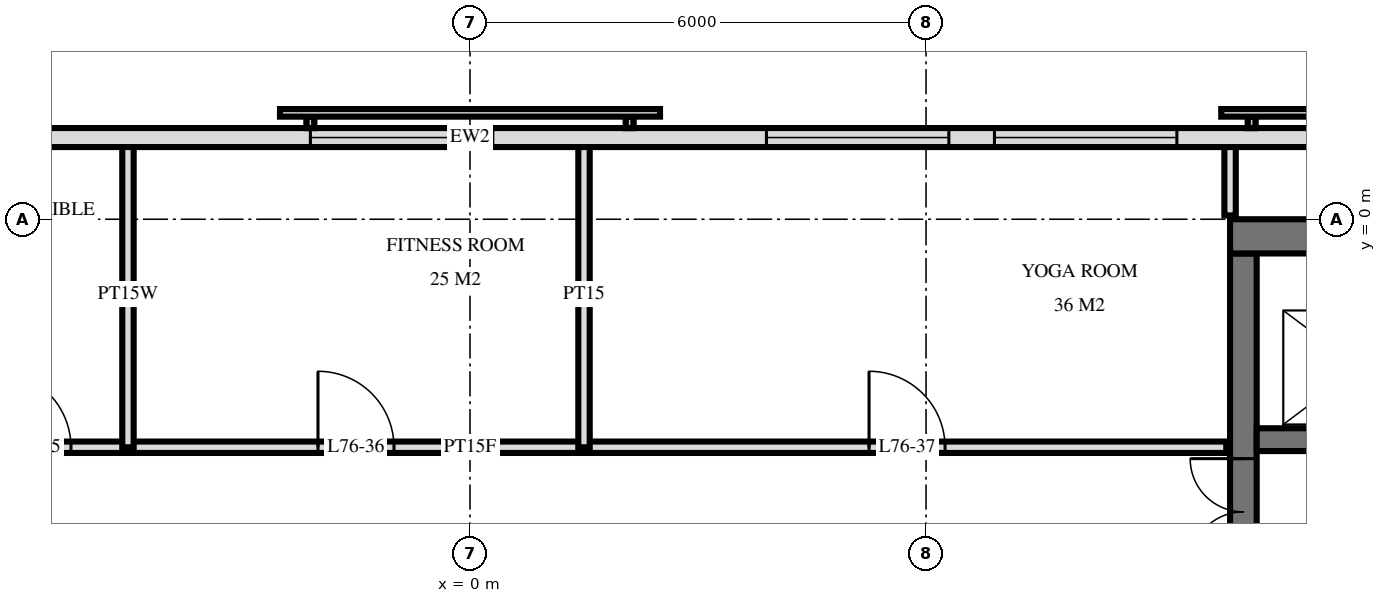
"""IFC4 building model, lengths in metres.
Left out: names, types, materials, properties, quantities, classifications, styles, units other than length and angle.
Written with IfcOpenShell. Run it as: python <this file> out.ifc"""

import sys

from ifc_helpers import new_model, si_unit, direction, frame, frame_2d, origin, place, context, subcontext, project, spatial, rectangle, extrude, element, fill, save


model = new_model("IFC4")
c1 = context("Model", 3, precision=1e-05, world=origin(), true_north=direction((0.0, 1.0)))
c2 = subcontext(c1, "Body", "Model", "MODEL_VIEW")
j1 = project(units=[si_unit("LENGTHUNIT", "METRE"), si_unit("PLANEANGLEUNIT", "RADIAN")], contexts=[c1])
p1 = place(None, origin())
s1 = spatial("IfcSite", under=j1, at=p1, CompositionType="ELEMENT")
p2 = place(p1, origin())
s2 = spatial("IfcBuilding", under=s1, at=p2, CompositionType="ELEMENT")
p3 = place(p2, frame((0.0, 0.0, 287.6)))
s3 = spatial("IfcBuildingStorey", under=s2, at=p3, CompositionType="ELEMENT", Elevation=287.6)
p4 = place(p3, frame((10.0, -0.225, 0.0), z_axis=(0.0, 0.0, 1.0), x_axis=(1.0, 0.0, 0.0)))
e1 = element("IfcWall", 1, at=p4, inside=s3, PredefinedType="SHEAR", context=c2, shape_type="SweptSolid", body=[
    extrude(rectangle(XDim=9.5, YDim=0.45, at=frame_2d((4.75, 0.0))), origin(), (0.0, 0.0, 1.0), 3.5),
])
p5 = place(p3, frame((10.175, -14.55, 0.0), z_axis=(0.0, 0.0, 1.0), x_axis=(0.0, 1.0, 0.0)))
e2 = element("IfcWall", 2, at=p5, inside=s3, PredefinedType="SHEAR", context=c2, shape_type="SweptSolid", body=[
    extrude(rectangle(XDim=14.1, YDim=0.35, at=frame_2d((7.05, 0.0))), origin(), (0.0, 0.0, 1.0), 3.5),
])
p6 = place(p5, frame((8.4, 0.0, 0.0)))
e3 = element("IfcOpeningElement", 3, at=p6, cuts=e2, PredefinedType="OPENING", context=c2, shape_type="SweptSolid", body=[
    extrude(rectangle(XDim=1.4, YDim=2.4, at=frame_2d((0.7, 1.2))), frame((0.0, 0.185, 0.0), z_axis=(0.0, -1.0, 0.0), x_axis=(1.0, 0.0, 0.0)), (0.0, 0.0, 1.0), 0.37),
])
p7 = place(p5, frame((10.0, 0.0, 0.0)))
e4 = element("IfcOpeningElement", 4, at=p7, cuts=e2, PredefinedType="OPENING", context=c2, shape_type="SweptSolid", body=[
    extrude(rectangle(XDim=1.4, YDim=2.4, at=frame_2d((0.7, 1.2))), frame((0.0, 0.185, 0.0), z_axis=(0.0, -1.0, 0.0), x_axis=(1.0, 0.0, 0.0)), (0.0, 0.0, 1.0), 0.37),
])
p8 = place(p5, frame((4.0, 0.0, 0.0)))
e5 = element("IfcOpeningElement", 5, at=p8, cuts=e2, PredefinedType="OPENING", context=c2, shape_type="SweptSolid", body=[
    extrude(rectangle(XDim=1.2, YDim=2.1, at=frame_2d((0.6, 1.05))), frame((0.0, 0.185, 0.0), z_axis=(0.0, -1.0, 0.0), x_axis=(1.0, 0.0, 0.0)), (0.0, 0.0, 1.0), 0.37),
])
p9 = place(p3, frame((10.35, -2.9, 0.0), z_axis=(0.0, 0.0, 1.0), x_axis=(1.0, 0.0, 0.0)))
e6 = element("IfcWall", 6, at=p9, inside=s3, PredefinedType="SHEAR", context=c2, shape_type="SweptSolid", body=[
    extrude(rectangle(XDim=8.7, YDim=0.3, at=frame_2d((4.35, 0.0))), origin(), (0.0, 0.0, 1.0), 3.5),
])
p10 = place(p9, frame((0.8, 0.0, 0.0)))
e7 = element("IfcOpeningElement", 7, at=p10, cuts=e6, PredefinedType="OPENING", context=c2, shape_type="SweptSolid", body=[
    extrude(rectangle(XDim=1.1, YDim=2.1, at=frame_2d((0.55, 1.05))), frame((0.0, 0.16, 0.0), z_axis=(0.0, -1.0, 0.0), x_axis=(1.0, 0.0, 0.0)), (0.0, 0.0, 1.0), 0.32),
])
p11 = place(p9, frame((3.8, 0.0, 0.0)))
e8 = element("IfcOpeningElement", 8, at=p11, cuts=e6, PredefinedType="OPENING", context=c2, shape_type="SweptSolid", body=[
    extrude(rectangle(XDim=1.1, YDim=2.1, at=frame_2d((0.55, 1.05))), frame((0.0, 0.16, 0.0), z_axis=(0.0, -1.0, 0.0), x_axis=(1.0, 0.0, 0.0)), (0.0, 0.0, 1.0), 0.32),
])
p12 = place(p9, frame((6.188, 0.0, 0.0)))
e9 = element("IfcOpeningElement", 9, at=p12, cuts=e6, PredefinedType="OPENING", context=c2, shape_type="SweptSolid", body=[
    extrude(rectangle(XDim=0.9, YDim=2.1, at=frame_2d((0.45, 1.05))), frame((0.0, 0.16, 0.0), z_axis=(0.0, -1.0, 0.0), x_axis=(1.0, 0.0, 0.0)), (0.0, 0.0, 1.0), 0.32),
])
p13 = place(p9, frame((7.613, 0.0, 0.0)))
e10 = element("IfcOpeningElement", 10, at=p13, cuts=e6, PredefinedType="OPENING", context=c2, shape_type="SweptSolid", body=[
    extrude(rectangle(XDim=0.9, YDim=2.1, at=frame_2d((0.45, 1.05))), frame((0.0, 0.16, 0.0), z_axis=(0.0, -1.0, 0.0), x_axis=(1.0, 0.0, 0.0)), (0.0, 0.0, 1.0), 0.32),
])
p14 = place(p3, frame((18.575, 1.075, 0.0), z_axis=(0.0, 0.0, 1.0), x_axis=(-1.0, 0.0, 0.0)))
e11 = element("IfcWall", 11, at=p14, inside=s3, PredefinedType="SOLIDWALL", context=c2, shape_type="SweptSolid", body=[
    extrude(rectangle(XDim=37.151, YDim=0.25, at=frame_2d((18.575, 0.0))), origin(), (0.0, 0.0, 1.0), 3.22),
])
p15 = place(p14, frame((9.275, 0.0, 0.9)))
e12 = element("IfcOpeningElement", 12, at=p15, cuts=e11, PredefinedType="OPENING", context=c2, shape_type="SweptSolid", body=[
    extrude(rectangle(XDim=2.4, YDim=1.5, at=frame_2d((1.2, 0.75))), frame((0.0, 0.135, 0.0), z_axis=(0.0, -1.0, 0.0), x_axis=(1.0, 0.0, 0.0)), (0.0, 0.0, 1.0), 0.27),
])
p16 = place(p14, frame((12.275, 0.0, 0.9)))
e13 = element("IfcOpeningElement", 13, at=p16, cuts=e11, PredefinedType="OPENING", context=c2, shape_type="SweptSolid", body=[
    extrude(rectangle(XDim=2.4, YDim=1.5, at=frame_2d((1.2, 0.75))), frame((0.0, 0.135, 0.0), z_axis=(0.0, -1.0, 0.0), x_axis=(1.0, 0.0, 0.0)), (0.0, 0.0, 1.0), 0.27),
])
p17 = place(p14, frame((18.275, 0.0, 0.9)))
e14 = element("IfcOpeningElement", 14, at=p17, cuts=e11, PredefinedType="OPENING", context=c2, shape_type="SweptSolid", body=[
    extrude(rectangle(XDim=2.4, YDim=1.5, at=frame_2d((1.2, 0.75))), frame((0.0, 0.135, 0.0), z_axis=(0.0, -1.0, 0.0), x_axis=(1.0, 0.0, 0.0)), (0.0, 0.0, 1.0), 0.27),
])
p18 = place(p3, frame((10.0, 0.05, 0.0), z_axis=(0.0, 0.0, 1.0), x_axis=(0.0, 1.0, 0.0)))
e15 = element("IfcWall", 15, at=p18, inside=s3, PredefinedType="PARTITIONING", context=c2, shape_type="SweptSolid", body=[
    extrude(rectangle(XDim=0.97, YDim=0.15, at=frame_2d((0.485, 0.0))), origin(), (0.0, 0.0, 1.0), 3.22),
])
p19 = place(p3, frame((1.5, -3.0, 0.0), z_axis=(0.0, 0.0, 1.0), x_axis=(0.0, 1.0, 0.0)))
e16 = element("IfcWall", 16, at=p19, inside=s3, PredefinedType="PARTITIONING", context=c2, shape_type="SweptSolid", body=[
    extrude(rectangle(XDim=4.02, YDim=0.15, at=frame_2d((2.01, 0.0))), origin(), (0.0, 0.0, 1.0), 3.22),
])
p20 = place(p3, frame((-4.5, -3.0, 0.0), z_axis=(0.0, 0.0, 1.0), x_axis=(0.0, 1.0, 0.0)))
e17 = element("IfcWall", 17, at=p20, inside=s3, PredefinedType="PLUMBINGWALL", context=c2, shape_type="SweptSolid", body=[
    extrude(rectangle(XDim=4.02, YDim=0.15, at=frame_2d((2.01, 0.0))), origin(), (0.0, 0.0, 1.0), 3.22),
])
p21 = place(p3, frame((-9.95, -3.0, 0.0), z_axis=(0.0, 0.0, 1.0), x_axis=(1.0, 0.0, 0.0)))
e18 = element("IfcWall", 18, at=p21, inside=s3, PredefinedType="PARTITIONING", context=c2, shape_type="SweptSolid", body=[
    extrude(rectangle(XDim=19.9, YDim=0.15, at=frame_2d((9.95, 0.0))), origin(), (0.0, 0.0, 1.0), 3.22),
])
p22 = place(p21, frame((0.95, 0.0, 0.0)))
e19 = element("IfcOpeningElement", 19, at=p22, cuts=e18, PredefinedType="OPENING", context=c2, shape_type="SweptSolid", body=[
    extrude(rectangle(XDim=1.0, YDim=2.1, at=frame_2d((0.5, 1.05))), frame((0.0, 0.085, 0.0), z_axis=(0.0, -1.0, 0.0), x_axis=(1.0, 0.0, 0.0)), (0.0, 0.0, 1.0), 0.17),
])
p23 = place(p21, frame((3.7, 0.0, 0.0)))
e20 = element("IfcOpeningElement", 20, at=p23, cuts=e18, PredefinedType="OPENING", context=c2, shape_type="SweptSolid", body=[
    extrude(rectangle(XDim=1.0, YDim=2.1, at=frame_2d((0.5, 1.05))), frame((0.0, 0.085, 0.0), z_axis=(0.0, -1.0, 0.0), x_axis=(1.0, 0.0, 0.0)), (0.0, 0.0, 1.0), 0.17),
])
p24 = place(p21, frame((7.95, 0.0, 0.0)))
e21 = element("IfcOpeningElement", 21, at=p24, cuts=e18, PredefinedType="OPENING", context=c2, shape_type="SweptSolid", body=[
    extrude(rectangle(XDim=1.0, YDim=2.1, at=frame_2d((0.5, 1.05))), frame((0.0, 0.085, 0.0), z_axis=(0.0, -1.0, 0.0), x_axis=(1.0, 0.0, 0.0)), (0.0, 0.0, 1.0), 0.17),
])
p25 = place(p21, frame((15.2, 0.0, 0.0)))
e22 = element("IfcOpeningElement", 22, at=p25, cuts=e18, PredefinedType="OPENING", context=c2, shape_type="SweptSolid", body=[
    extrude(rectangle(XDim=1.0, YDim=2.1, at=frame_2d((0.5, 1.05))), frame((0.0, 0.085, 0.0), z_axis=(0.0, -1.0, 0.0), x_axis=(1.0, 0.0, 0.0)), (0.0, 0.0, 1.0), 0.17),
])
p26 = place(p15, origin())
e23 = element("IfcWindow", 23, at=p26, inside=s3, PartitioningType="SINGLE_PANEL", PredefinedType="WINDOW", context=c2, shape_type="SweptSolid", body=[
    extrude(rectangle(XDim=2.4, YDim=1.5, at=frame_2d((1.2, 0.75))), frame((0.0, 0.03, 0.0), z_axis=(0.0, -1.0, 0.0), x_axis=(1.0, 0.0, 0.0)), (0.0, 0.0, 1.0), 0.06),
])
fill(e12, e23)
p27 = place(p16, origin())
e24 = element("IfcWindow", 24, at=p27, inside=s3, PartitioningType="SINGLE_PANEL", PredefinedType="WINDOW", context=c2, shape_type="SweptSolid", body=[
    extrude(rectangle(XDim=2.4, YDim=1.5, at=frame_2d((1.2, 0.75))), frame((0.0, 0.03, 0.0), z_axis=(0.0, -1.0, 0.0), x_axis=(1.0, 0.0, 0.0)), (0.0, 0.0, 1.0), 0.06),
])
fill(e13, e24)
p28 = place(p17, origin())
e25 = element("IfcWindow", 25, at=p28, inside=s3, PartitioningType="SINGLE_PANEL", PredefinedType="WINDOW", context=c2, shape_type="SweptSolid", body=[
    extrude(rectangle(XDim=2.4, YDim=1.5, at=frame_2d((1.2, 0.75))), frame((0.0, 0.03, 0.0), z_axis=(0.0, -1.0, 0.0), x_axis=(1.0, 0.0, 0.0)), (0.0, 0.0, 1.0), 0.06),
])
fill(e14, e25)
p29 = place(p7, origin())
e26 = element("IfcDoor", 26, at=p29, inside=s3, OperationType="DOUBLE_DOOR_SINGLE_SWING", PredefinedType="DOOR", context=c2, shape_type="SweptSolid", body=[
    extrude(rectangle(XDim=1.4, YDim=2.4, at=frame_2d((0.7, 1.2))), frame((0.0, 0.025, 0.0), z_axis=(0.0, -1.0, 0.0), x_axis=(1.0, 0.0, 0.0)), (0.0, 0.0, 1.0), 0.05),
])
fill(e4, e26)
p30 = place(p23, origin())
e27 = element("IfcDoor", 27, at=p30, inside=s3, OperationType="SINGLE_SWING_RIGHT", PredefinedType="DOOR", context=c2, shape_type="SweptSolid", body=[
    extrude(rectangle(XDim=1.0, YDim=2.1, at=frame_2d((0.5, 1.05))), frame((0.0, 0.025, 0.0), z_axis=(0.0, -1.0, 0.0), x_axis=(1.0, 0.0, 0.0)), (0.0, 0.0, 1.0), 0.05),
])
fill(e20, e27)
p31 = place(p24, origin())
e28 = element("IfcDoor", 28, at=p31, inside=s3, OperationType="SINGLE_SWING_RIGHT", PredefinedType="DOOR", context=c2, shape_type="SweptSolid", body=[
    extrude(rectangle(XDim=1.0, YDim=2.1, at=frame_2d((0.5, 1.05))), frame((0.0, 0.025, 0.0), z_axis=(0.0, -1.0, 0.0), x_axis=(1.0, 0.0, 0.0)), (0.0, 0.0, 1.0), 0.05),
])
fill(e21, e28)
p32 = place(p25, origin())
e29 = element("IfcDoor", 29, at=p32, inside=s3, OperationType="SINGLE_SWING_RIGHT", PredefinedType="DOOR", context=c2, shape_type="SweptSolid", body=[
    extrude(rectangle(XDim=1.0, YDim=2.1, at=frame_2d((0.5, 1.05))), frame((0.0, 0.025, 0.0), z_axis=(0.0, -1.0, 0.0), x_axis=(1.0, 0.0, 0.0)), (0.0, 0.0, 1.0), 0.05),
])
fill(e22, e29)
save(model, sys.argv[1])
